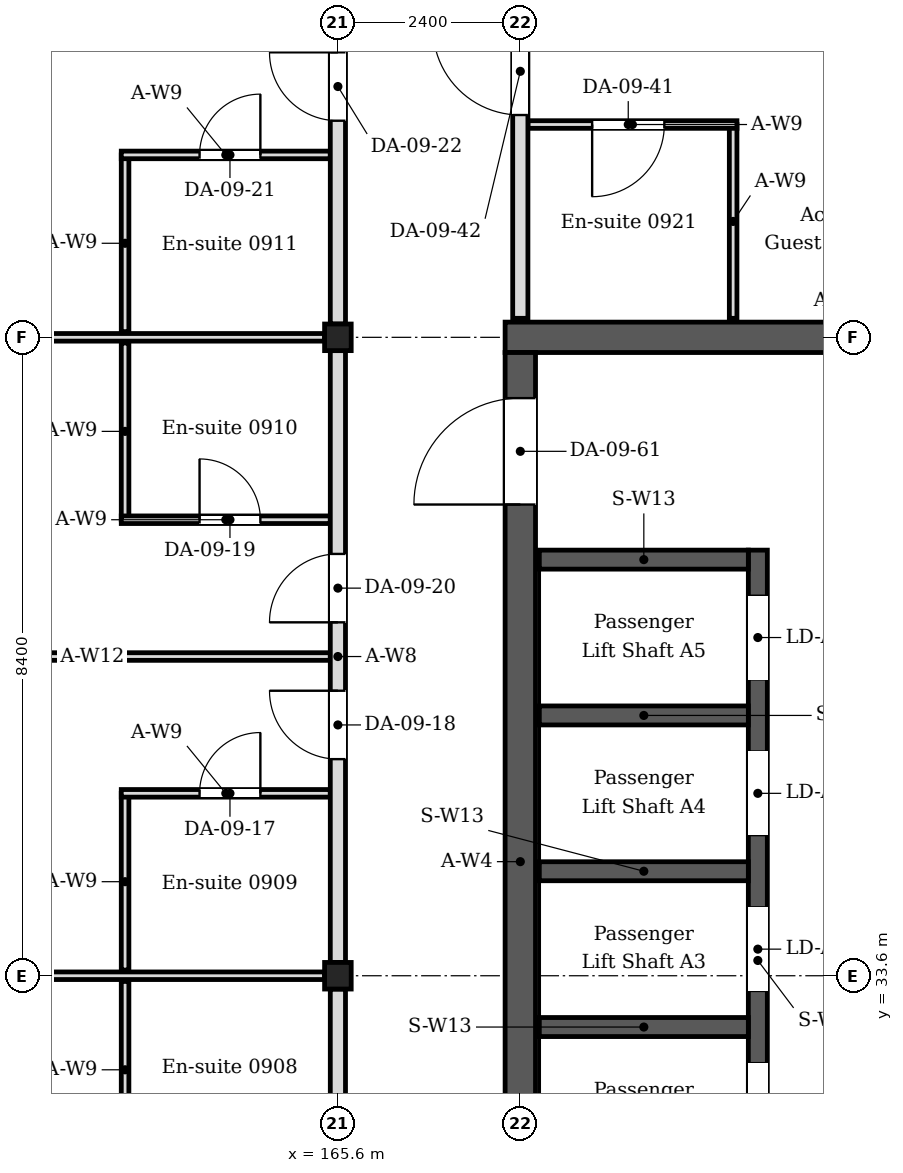
"""IFC4 building model, lengths in metres.
Left out: names, types, materials, properties, quantities, classifications, styles, units other than length and angle.
Written with IfcOpenShell. Run it as: python <this file> out.ifc"""

import sys

from ifc_helpers import new_model, si_unit, direction, frame, frame_2d, origin, origin_2d, place, context, subcontext, project, spatial, rectangle, i_section, extrude, element, fill, save


model = new_model("IFC4")
c1 = context("Model", 3, precision=1e-05, world=origin(), true_north=direction((0.0, 1.0)))
c2 = subcontext(c1, "Body", "Model", "MODEL_VIEW")
j1 = project(units=[si_unit("LENGTHUNIT", "METRE"), si_unit("PLANEANGLEUNIT", "RADIAN")], contexts=[c1])
p1 = place(None, origin())
s1 = spatial("IfcSite", under=j1, at=p1, CompositionType="ELEMENT")
p2 = place(p1, origin())
s2 = spatial("IfcBuilding", under=s1, at=p2, CompositionType="ELEMENT")
p3 = place(p2, frame((0.0, 0.0, 39.6)))
s3 = spatial("IfcBuildingStorey", under=s2, at=p3, CompositionType="ELEMENT", Elevation=39.6)
for number, where, z_axis, x_axis in (
    (1, (165.6, 33.6, 0.0), (0.0, 0.0, 1.0), (1.0, 0.0, 0.0)),
    (2, (165.6, 42.0, 0.0), (0.0, 0.0, 1.0), (1.0, 0.0, 0.0)),
):
    element("IfcColumn", number, at=place(p3, frame(where, z_axis=z_axis, x_axis=x_axis)), inside=s3, PredefinedType="COLUMN", context=c2, shape_type="SweptSolid", body=[
        extrude(i_section(OverallWidth=0.35, OverallDepth=0.35, WebThickness=0.012, FlangeThickness=0.019, FilletRadius=0.013, at=origin_2d()), origin(), (0.0, 0.0, 1.0), 4.2),
    ])
p4 = place(p3, frame((167.8, 42.0, 0.0), z_axis=(0.0, 0.0, 1.0), x_axis=(1.0, 0.0, 0.0)))
e3 = element("IfcWall", 3, at=p4, inside=s3, PredefinedType="SOLIDWALL", context=c2, shape_type="SweptSolid", body=[
    extrude(rectangle(XDim=8.8, YDim=0.4, at=frame_2d((4.4, 0.0))), origin(), (0.0, 0.0, 1.0), 4.05),
])
p5 = place(p3, frame((168.0, 25.4, 0.0), z_axis=(0.0, 0.0, 1.0), x_axis=(0.0, 1.0, 0.0)))
e4 = element("IfcWall", 4, at=p5, inside=s3, PredefinedType="SOLIDWALL", context=c2, shape_type="SweptSolid", body=[
    extrude(rectangle(XDim=16.4, YDim=0.4, at=frame_2d((8.2, 0.0))), origin(), (0.0, 0.0, 1.0), 4.05),
])
p6 = place(p5, frame((1.0, 0.0, 0.0)))
e5 = element("IfcOpeningElement", 5, at=p6, cuts=e4, PredefinedType="OPENING", context=c2, shape_type="SweptSolid", body=[
    extrude(rectangle(XDim=1.0, YDim=2.1, at=frame_2d((0.5, 1.05))), frame((0.0, 0.21, 0.0), z_axis=(0.0, -1.0, 0.0), x_axis=(1.0, 0.0, 0.0)), (0.0, 0.0, 1.0), 0.42),
])
p7 = place(p5, frame((14.4, 0.0, 0.0)))
e6 = element("IfcOpeningElement", 6, at=p7, cuts=e4, PredefinedType="OPENING", context=c2, shape_type="SweptSolid", body=[
    extrude(rectangle(XDim=1.4, YDim=2.1, at=frame_2d((0.7, 1.05))), frame((0.0, 0.21, 0.0), z_axis=(0.0, -1.0, 0.0), x_axis=(1.0, 0.0, 0.0)), (0.0, 0.0, 1.0), 0.42),
])
for number, where, z_axis, x_axis in (
    (7, (162.8, 31.2, 0.0), (0.0, 0.0, 1.0), (0.0, 1.0, 0.0)),
    (8, (162.8, 33.675, 0.0), (0.0, 0.0, 1.0), (0.0, 1.0, 0.0)),
):
    element("IfcWall", number, at=place(p3, frame(where, z_axis=z_axis, x_axis=x_axis)), inside=s3, PredefinedType="PARTITIONING", context=c2, shape_type="SweptSolid", body=[
        extrude(rectangle(XDim=2.325, YDim=0.1, at=frame_2d((1.163, 0.0))), origin(), (0.0, 0.0, 1.0), 4.05),
    ])
p8 = place(p3, frame((162.75, 36.0, 0.0), z_axis=(0.0, 0.0, 1.0), x_axis=(1.0, 0.0, 0.0)))
e9 = element("IfcWall", 9, at=p8, inside=s3, PredefinedType="PARTITIONING", context=c2, shape_type="SweptSolid", body=[
    extrude(rectangle(XDim=2.75, YDim=0.1, at=frame_2d((1.375, 0.0))), origin(), (0.0, 0.0, 1.0), 4.05),
])
p9 = place(p8, frame((1.03, 0.0, 0.0)))
e10 = element("IfcOpeningElement", 10, at=p9, cuts=e9, PredefinedType="OPENING", context=c2, shape_type="SweptSolid", body=[
    extrude(rectangle(XDim=0.8, YDim=2.1, at=frame_2d((0.4, 1.05))), frame((0.0, 0.06, 0.0), z_axis=(0.0, -1.0, 0.0), x_axis=(1.0, 0.0, 0.0)), (0.0, 0.0, 1.0), 0.12),
])
p10 = place(p3, frame((162.8, 39.6, 0.0), z_axis=(0.0, 0.0, 1.0), x_axis=(0.0, 1.0, 0.0)))
e11 = element("IfcWall", 11, at=p10, inside=s3, PredefinedType="PARTITIONING", context=c2, shape_type="SweptSolid", body=[
    extrude(rectangle(XDim=2.325, YDim=0.1, at=frame_2d((1.163, 0.0))), origin(), (0.0, 0.0, 1.0), 4.05),
])
p11 = place(p3, frame((162.75, 39.6, 0.0), z_axis=(0.0, 0.0, 1.0), x_axis=(1.0, 0.0, 0.0)))
e12 = element("IfcWall", 12, at=p11, inside=s3, PredefinedType="PARTITIONING", context=c2, shape_type="SweptSolid", body=[
    extrude(rectangle(XDim=2.75, YDim=0.1, at=frame_2d((1.375, 0.0))), origin(), (0.0, 0.0, 1.0), 4.05),
])
p12 = place(p11, frame((1.03, 0.0, 0.0)))
e13 = element("IfcOpeningElement", 13, at=p12, cuts=e12, PredefinedType="OPENING", context=c2, shape_type="SweptSolid", body=[
    extrude(rectangle(XDim=0.8, YDim=2.1, at=frame_2d((0.4, 1.05))), frame((0.0, 0.06, 0.0), z_axis=(0.0, -1.0, 0.0), x_axis=(1.0, 0.0, 0.0)), (0.0, 0.0, 1.0), 0.12),
])
p13 = place(p3, frame((162.8, 42.075, 0.0), z_axis=(0.0, 0.0, 1.0), x_axis=(0.0, 1.0, 0.0)))
e14 = element("IfcWall", 14, at=p13, inside=s3, PredefinedType="PARTITIONING", context=c2, shape_type="SweptSolid", body=[
    extrude(rectangle(XDim=2.325, YDim=0.1, at=frame_2d((1.163, 0.0))), origin(), (0.0, 0.0, 1.0), 4.05),
])
p14 = place(p3, frame((162.75, 44.4, 0.0), z_axis=(0.0, 0.0, 1.0), x_axis=(1.0, 0.0, 0.0)))
e15 = element("IfcWall", 15, at=p14, inside=s3, PredefinedType="PARTITIONING", context=c2, shape_type="SweptSolid", body=[
    extrude(rectangle(XDim=2.75, YDim=0.1, at=frame_2d((1.375, 0.0))), origin(), (0.0, 0.0, 1.0), 4.05),
])
p15 = place(p14, frame((1.03, 0.0, 0.0)))
e16 = element("IfcOpeningElement", 16, at=p15, cuts=e15, PredefinedType="OPENING", context=c2, shape_type="SweptSolid", body=[
    extrude(rectangle(XDim=0.8, YDim=2.1, at=frame_2d((0.4, 1.05))), frame((0.0, 0.06, 0.0), z_axis=(0.0, -1.0, 0.0), x_axis=(1.0, 0.0, 0.0)), (0.0, 0.0, 1.0), 0.12),
])
p16 = place(p3, frame((170.8, 42.25, 0.0), z_axis=(0.0, 0.0, 1.0), x_axis=(0.0, 1.0, 0.0)))
e17 = element("IfcWall", 17, at=p16, inside=s3, PredefinedType="PARTITIONING", context=c2, shape_type="SweptSolid", body=[
    extrude(rectangle(XDim=2.55, YDim=0.1, at=frame_2d((1.275, 0.0))), origin(), (0.0, 0.0, 1.0), 4.05),
])
p17 = place(p3, frame((170.85, 44.8, 0.0), z_axis=(0.0, 0.0, 1.0), x_axis=(-1.0, 0.0, 0.0)))
e18 = element("IfcWall", 18, at=p17, inside=s3, PredefinedType="PARTITIONING", context=c2, shape_type="SweptSolid", body=[
    extrude(rectangle(XDim=2.75, YDim=0.1, at=frame_2d((1.375, 0.0))), origin(), (0.0, 0.0, 1.0), 4.05),
])
p18 = place(p17, frame((0.955, 0.0, 0.0)))
e19 = element("IfcOpeningElement", 19, at=p18, cuts=e18, PredefinedType="OPENING", context=c2, shape_type="SweptSolid", body=[
    extrude(rectangle(XDim=0.95, YDim=2.1, at=frame_2d((0.475, 1.05))), frame((0.0, 0.06, 0.0), z_axis=(0.0, -1.0, 0.0), x_axis=(1.0, 0.0, 0.0)), (0.0, 0.0, 1.0), 0.12),
])
for number, where, z_axis, x_axis in (
    (20, (157.375, 33.6, 0.0), (0.0, 0.0, 1.0), (1.0, 0.0, 0.0)),
    (21, (157.375, 42.0, 0.0), (0.0, 0.0, 1.0), (1.0, 0.0, 0.0)),
):
    element("IfcWall", number, at=place(p3, frame(where, z_axis=z_axis, x_axis=x_axis)), inside=s3, PredefinedType="PARTITIONING", context=c2, shape_type="SweptSolid", body=[
        extrude(rectangle(XDim=8.05, YDim=0.1, at=frame_2d((4.025, 0.0))), origin(), (0.0, 0.0, 1.0), 3.604),
    ])
p19 = place(p3, frame((159.24, 37.8, 0.0), z_axis=(0.0, 0.0, 1.0), x_axis=(1.0, 0.0, 0.0)))
e22 = element("IfcWall", 22, at=p19, inside=s3, PredefinedType="PARTITIONING", context=c2, shape_type="SweptSolid", body=[
    extrude(rectangle(XDim=6.26, YDim=0.1, at=frame_2d((3.13, 0.0))), origin(), (0.0, 0.0, 1.0), 3.604),
])
p20 = place(p3, frame((165.6, 25.375, 0.0), z_axis=(0.0, 0.0, 1.0), x_axis=(0.0, 1.0, 0.0)))
e23 = element("IfcWall", 23, at=p20, inside=s3, PredefinedType="PARTITIONING", context=c2, shape_type="SweptSolid", body=[
    extrude(rectangle(XDim=8.05, YDim=0.2, at=frame_2d((4.025, 0.0))), origin(), (0.0, 0.0, 1.0), 3.45),
])
p21 = place(p20, frame((2.675, 0.0, 0.0)))
e24 = element("IfcOpeningElement", 24, at=p21, cuts=e23, PredefinedType="OPENING", context=c2, shape_type="SweptSolid", body=[
    extrude(rectangle(XDim=0.9, YDim=2.1, at=frame_2d((0.45, 1.05))), frame((0.0, 0.11, 0.0), z_axis=(0.0, -1.0, 0.0), x_axis=(1.0, 0.0, 0.0)), (0.0, 0.0, 1.0), 0.22),
])
p22 = place(p20, frame((4.475, 0.0, 0.0)))
e25 = element("IfcOpeningElement", 25, at=p22, cuts=e23, PredefinedType="OPENING", context=c2, shape_type="SweptSolid", body=[
    extrude(rectangle(XDim=0.9, YDim=2.1, at=frame_2d((0.45, 1.05))), frame((0.0, 0.11, 0.0), z_axis=(0.0, -1.0, 0.0), x_axis=(1.0, 0.0, 0.0)), (0.0, 0.0, 1.0), 0.22),
])
p23 = place(p3, frame((165.6, 33.775, 0.0), z_axis=(0.0, 0.0, 1.0), x_axis=(0.0, 1.0, 0.0)))
e26 = element("IfcWall", 26, at=p23, inside=s3, PredefinedType="PARTITIONING", context=c2, shape_type="SweptSolid", body=[
    extrude(rectangle(XDim=8.05, YDim=0.2, at=frame_2d((4.025, 0.0))), origin(), (0.0, 0.0, 1.0), 3.45),
])
p24 = place(p23, frame((2.675, 0.0, 0.0)))
e27 = element("IfcOpeningElement", 27, at=p24, cuts=e26, PredefinedType="OPENING", context=c2, shape_type="SweptSolid", body=[
    extrude(rectangle(XDim=0.9, YDim=2.1, at=frame_2d((0.45, 1.05))), frame((0.0, 0.11, 0.0), z_axis=(0.0, -1.0, 0.0), x_axis=(1.0, 0.0, 0.0)), (0.0, 0.0, 1.0), 0.22),
])
p25 = place(p23, frame((4.475, 0.0, 0.0)))
e28 = element("IfcOpeningElement", 28, at=p25, cuts=e26, PredefinedType="OPENING", context=c2, shape_type="SweptSolid", body=[
    extrude(rectangle(XDim=0.9, YDim=2.1, at=frame_2d((0.45, 1.05))), frame((0.0, 0.11, 0.0), z_axis=(0.0, -1.0, 0.0), x_axis=(1.0, 0.0, 0.0)), (0.0, 0.0, 1.0), 0.22),
])
p26 = place(p3, frame((165.6, 42.175, 0.0), z_axis=(0.0, 0.0, 1.0), x_axis=(0.0, 1.0, 0.0)))
e29 = element("IfcWall", 29, at=p26, inside=s3, PredefinedType="PARTITIONING", context=c2, shape_type="SweptSolid", body=[
    extrude(rectangle(XDim=8.05, YDim=0.2, at=frame_2d((4.025, 0.0))), origin(), (0.0, 0.0, 1.0), 3.45),
])
p27 = place(p26, frame((2.675, 0.0, 0.0)))
e30 = element("IfcOpeningElement", 30, at=p27, cuts=e29, PredefinedType="OPENING", context=c2, shape_type="SweptSolid", body=[
    extrude(rectangle(XDim=0.9, YDim=2.1, at=frame_2d((0.45, 1.05))), frame((0.0, 0.11, 0.0), z_axis=(0.0, -1.0, 0.0), x_axis=(1.0, 0.0, 0.0)), (0.0, 0.0, 1.0), 0.22),
])
p28 = place(p26, frame((4.475, 0.0, 0.0)))
e31 = element("IfcOpeningElement", 31, at=p28, cuts=e29, PredefinedType="OPENING", context=c2, shape_type="SweptSolid", body=[
    extrude(rectangle(XDim=0.9, YDim=2.1, at=frame_2d((0.45, 1.05))), frame((0.0, 0.11, 0.0), z_axis=(0.0, -1.0, 0.0), x_axis=(1.0, 0.0, 0.0)), (0.0, 0.0, 1.0), 0.22),
])
p29 = place(p3, frame((168.0, 42.25, 0.0), z_axis=(0.0, 0.0, 1.0), x_axis=(0.0, 1.0, 0.0)))
e32 = element("IfcWall", 32, at=p29, inside=s3, PredefinedType="PARTITIONING", context=c2, shape_type="SweptSolid", body=[
    extrude(rectangle(XDim=7.975, YDim=0.2, at=frame_2d((3.988, 0.0))), origin(), (0.0, 0.0, 1.0), 3.45),
])
p30 = place(p29, frame((2.675, 0.0, 0.0)))
e33 = element("IfcOpeningElement", 33, at=p30, cuts=e32, PredefinedType="OPENING", context=c2, shape_type="SweptSolid", body=[
    extrude(rectangle(XDim=1.15, YDim=2.1, at=frame_2d((0.575, 1.05))), frame((0.0, 0.11, 0.0), z_axis=(0.0, -1.0, 0.0), x_axis=(1.0, 0.0, 0.0)), (0.0, 0.0, 1.0), 0.22),
])
p31 = place(p29, frame((4.4, 0.0, 0.0)))
e34 = element("IfcOpeningElement", 34, at=p31, cuts=e32, PredefinedType="OPENING", context=c2, shape_type="SweptSolid", body=[
    extrude(rectangle(XDim=0.9, YDim=2.1, at=frame_2d((0.45, 1.05))), frame((0.0, 0.11, 0.0), z_axis=(0.0, -1.0, 0.0), x_axis=(1.0, 0.0, 0.0)), (0.0, 0.0, 1.0), 0.22),
])
p32 = place(p3, frame((171.125, 28.3, 0.0), z_axis=(0.0, 0.0, 1.0), x_axis=(0.0, 1.0, 0.0)))
e35 = element("IfcWall", 35, at=p32, inside=s3, PredefinedType="SOLIDWALL", context=c2, shape_type="SweptSolid", body=[
    extrude(rectangle(XDim=10.9, YDim=0.25, at=frame_2d((5.45, 0.0))), origin(), (0.0, 0.0, 1.0), 4.05),
])
p33 = place(p32, frame((0.8, 0.0, 0.0)))
e36 = element("IfcOpeningElement", 36, at=p33, cuts=e35, PredefinedType="OPENING", context=c2, shape_type="SweptSolid", body=[
    extrude(rectangle(XDim=1.1, YDim=2.1, at=frame_2d((0.55, 1.05))), frame((0.0, 0.135, 0.0), z_axis=(0.0, -1.0, 0.0), x_axis=(1.0, 0.0, 0.0)), (0.0, 0.0, 1.0), 0.27),
])
p34 = place(p32, frame((3.05, 0.0, 0.0)))
e37 = element("IfcOpeningElement", 37, at=p34, cuts=e35, PredefinedType="OPENING", context=c2, shape_type="SweptSolid", body=[
    extrude(rectangle(XDim=1.1, YDim=2.1, at=frame_2d((0.55, 1.05))), frame((0.0, 0.135, 0.0), z_axis=(0.0, -1.0, 0.0), x_axis=(1.0, 0.0, 0.0)), (0.0, 0.0, 1.0), 0.27),
])
p35 = place(p32, frame((5.1, 0.0, 0.0)))
e38 = element("IfcOpeningElement", 38, at=p35, cuts=e35, PredefinedType="OPENING", context=c2, shape_type="SweptSolid", body=[
    extrude(rectangle(XDim=1.1, YDim=2.1, at=frame_2d((0.55, 1.05))), frame((0.0, 0.135, 0.0), z_axis=(0.0, -1.0, 0.0), x_axis=(1.0, 0.0, 0.0)), (0.0, 0.0, 1.0), 0.27),
])
p36 = place(p32, frame((7.15, 0.0, 0.0)))
e39 = element("IfcOpeningElement", 39, at=p36, cuts=e35, PredefinedType="OPENING", context=c2, shape_type="SweptSolid", body=[
    extrude(rectangle(XDim=1.1, YDim=2.1, at=frame_2d((0.55, 1.05))), frame((0.0, 0.135, 0.0), z_axis=(0.0, -1.0, 0.0), x_axis=(1.0, 0.0, 0.0)), (0.0, 0.0, 1.0), 0.27),
])
p37 = place(p32, frame((9.2, 0.0, 0.0)))
e40 = element("IfcOpeningElement", 40, at=p37, cuts=e35, PredefinedType="OPENING", context=c2, shape_type="SweptSolid", body=[
    extrude(rectangle(XDim=1.1, YDim=2.1, at=frame_2d((0.55, 1.05))), frame((0.0, 0.135, 0.0), z_axis=(0.0, -1.0, 0.0), x_axis=(1.0, 0.0, 0.0)), (0.0, 0.0, 1.0), 0.27),
])
for number, where, z_axis, x_axis in (
    (41, (168.25, 32.925, 0.0), (0.0, 0.0, 1.0), (1.0, 0.0, 0.0)),
    (42, (168.25, 34.975, 0.0), (0.0, 0.0, 1.0), (1.0, 0.0, 0.0)),
    (43, (168.25, 37.025, 0.0), (0.0, 0.0, 1.0), (1.0, 0.0, 0.0)),
    (44, (168.25, 39.075, 0.0), (0.0, 0.0, 1.0), (1.0, 0.0, 0.0)),
):
    element("IfcWall", number, at=place(p3, frame(where, z_axis=z_axis, x_axis=x_axis)), inside=s3, PredefinedType="SOLIDWALL", context=c2, shape_type="SweptSolid", body=[
        extrude(rectangle(XDim=2.75, YDim=0.25, at=frame_2d((1.375, 0.0))), origin(), (0.0, 0.0, 1.0), 4.05),
    ])
p38 = place(p9, origin())
e45 = element("IfcDoor", 45, at=p38, inside=s3, OperationType="SINGLE_SWING_RIGHT", PredefinedType="DOOR", context=c2, shape_type="SweptSolid", body=[
    extrude(rectangle(XDim=0.8, YDim=2.1, at=frame_2d((0.4, 1.05))), frame((0.0, 0.025, 0.0), z_axis=(0.0, -1.0, 0.0), x_axis=(1.0, 0.0, 0.0)), (0.0, 0.0, 1.0), 0.05),
])
fill(e10, e45)
p39 = place(p24, origin())
e46 = element("IfcDoor", 46, at=p39, inside=s3, OperationType="SINGLE_SWING_RIGHT", PredefinedType="DOOR", context=c2, shape_type="SweptSolid", body=[
    extrude(rectangle(XDim=0.9, YDim=2.1, at=frame_2d((0.45, 1.05))), frame((0.0, 0.025, 0.0), z_axis=(0.0, -1.0, 0.0), x_axis=(1.0, 0.0, 0.0)), (0.0, 0.0, 1.0), 0.05),
])
fill(e27, e46)
p40 = place(p12, origin())
e47 = element("IfcDoor", 47, at=p40, inside=s3, OperationType="SINGLE_SWING_LEFT", PredefinedType="DOOR", context=c2, shape_type="SweptSolid", body=[
    extrude(rectangle(XDim=0.8, YDim=2.1, at=frame_2d((0.4, 1.05))), frame((0.0, 0.025, 0.0), z_axis=(0.0, -1.0, 0.0), x_axis=(1.0, 0.0, 0.0)), (0.0, 0.0, 1.0), 0.05),
])
fill(e13, e47)
p41 = place(p25, origin())
e48 = element("IfcDoor", 48, at=p41, inside=s3, OperationType="SINGLE_SWING_LEFT", PredefinedType="DOOR", context=c2, shape_type="SweptSolid", body=[
    extrude(rectangle(XDim=0.9, YDim=2.1, at=frame_2d((0.45, 1.05))), frame((0.0, 0.025, 0.0), z_axis=(0.0, -1.0, 0.0), x_axis=(1.0, 0.0, 0.0)), (0.0, 0.0, 1.0), 0.05),
])
fill(e28, e48)
p42 = place(p15, origin())
e49 = element("IfcDoor", 49, at=p42, inside=s3, OperationType="SINGLE_SWING_RIGHT", PredefinedType="DOOR", context=c2, shape_type="SweptSolid", body=[
    extrude(rectangle(XDim=0.8, YDim=2.1, at=frame_2d((0.4, 1.05))), frame((0.0, 0.025, 0.0), z_axis=(0.0, -1.0, 0.0), x_axis=(1.0, 0.0, 0.0)), (0.0, 0.0, 1.0), 0.05),
])
fill(e16, e49)
p43 = place(p27, origin())
e50 = element("IfcDoor", 50, at=p43, inside=s3, OperationType="SINGLE_SWING_RIGHT", PredefinedType="DOOR", context=c2, shape_type="SweptSolid", body=[
    extrude(rectangle(XDim=0.9, YDim=2.1, at=frame_2d((0.45, 1.05))), frame((0.0, 0.025, 0.0), z_axis=(0.0, -1.0, 0.0), x_axis=(1.0, 0.0, 0.0)), (0.0, 0.0, 1.0), 0.05),
])
fill(e30, e50)
p44 = place(p18, origin())
e51 = element("IfcDoor", 51, at=p44, inside=s3, OperationType="SINGLE_SWING_RIGHT", PredefinedType="DOOR", context=c2, shape_type="SweptSolid", body=[
    extrude(rectangle(XDim=0.95, YDim=2.1, at=frame_2d((0.475, 1.05))), frame((0.0, 0.025, 0.0), z_axis=(0.0, -1.0, 0.0), x_axis=(1.0, 0.0, 0.0)), (0.0, 0.0, 1.0), 0.05),
])
fill(e19, e51)
p45 = place(p30, origin())
e52 = element("IfcDoor", 52, at=p45, inside=s3, OperationType="SINGLE_SWING_RIGHT", PredefinedType="DOOR", context=c2, shape_type="SweptSolid", body=[
    extrude(rectangle(XDim=1.15, YDim=2.1, at=frame_2d((0.575, 1.05))), frame((0.0, 0.025, 0.0), z_axis=(0.0, -1.0, 0.0), x_axis=(1.0, 0.0, 0.0)), (0.0, 0.0, 1.0), 0.05),
])
fill(e33, e52)
p46 = place(p34, origin())
e53 = element("IfcDoor", 53, at=p46, inside=s3, OperationType="SLIDING_TO_LEFT", PredefinedType="DOOR", context=c2, shape_type="SweptSolid", body=[
    extrude(rectangle(XDim=1.1, YDim=2.1, at=frame_2d((0.55, 1.05))), frame((0.0, 0.025, 0.0), z_axis=(0.0, -1.0, 0.0), x_axis=(1.0, 0.0, 0.0)), (0.0, 0.0, 1.0), 0.05),
])
fill(e37, e53)
p47 = place(p35, origin())
e54 = element("IfcDoor", 54, at=p47, inside=s3, OperationType="SLIDING_TO_LEFT", PredefinedType="DOOR", context=c2, shape_type="SweptSolid", body=[
    extrude(rectangle(XDim=1.1, YDim=2.1, at=frame_2d((0.55, 1.05))), frame((0.0, 0.025, 0.0), z_axis=(0.0, -1.0, 0.0), x_axis=(1.0, 0.0, 0.0)), (0.0, 0.0, 1.0), 0.05),
])
fill(e38, e54)
p48 = place(p36, origin())
e55 = element("IfcDoor", 55, at=p48, inside=s3, OperationType="SLIDING_TO_LEFT", PredefinedType="DOOR", context=c2, shape_type="SweptSolid", body=[
    extrude(rectangle(XDim=1.1, YDim=2.1, at=frame_2d((0.55, 1.05))), frame((0.0, 0.025, 0.0), z_axis=(0.0, -1.0, 0.0), x_axis=(1.0, 0.0, 0.0)), (0.0, 0.0, 1.0), 0.05),
])
fill(e39, e55)
p49 = place(p37, origin())
e56 = element("IfcDoor", 56, at=p49, inside=s3, OperationType="SLIDING_TO_LEFT", PredefinedType="DOOR", context=c2, shape_type="SweptSolid", body=[
    extrude(rectangle(XDim=1.1, YDim=2.1, at=frame_2d((0.55, 1.05))), frame((0.0, 0.025, 0.0), z_axis=(0.0, -1.0, 0.0), x_axis=(1.0, 0.0, 0.0)), (0.0, 0.0, 1.0), 0.05),
])
fill(e40, e56)
p50 = place(p7, origin())
e57 = element("IfcDoor", 57, at=p50, inside=s3, OperationType="DOUBLE_DOOR_DOUBLE_SWING", PredefinedType="DOOR", context=c2, shape_type="SweptSolid", body=[
    extrude(rectangle(XDim=1.4, YDim=2.1, at=frame_2d((0.7, 1.05))), frame((0.0, 0.025, 0.0), z_axis=(0.0, -1.0, 0.0), x_axis=(1.0, 0.0, 0.0)), (0.0, 0.0, 1.0), 0.05),
])
fill(e6, e57)
save(model, sys.argv[1])
